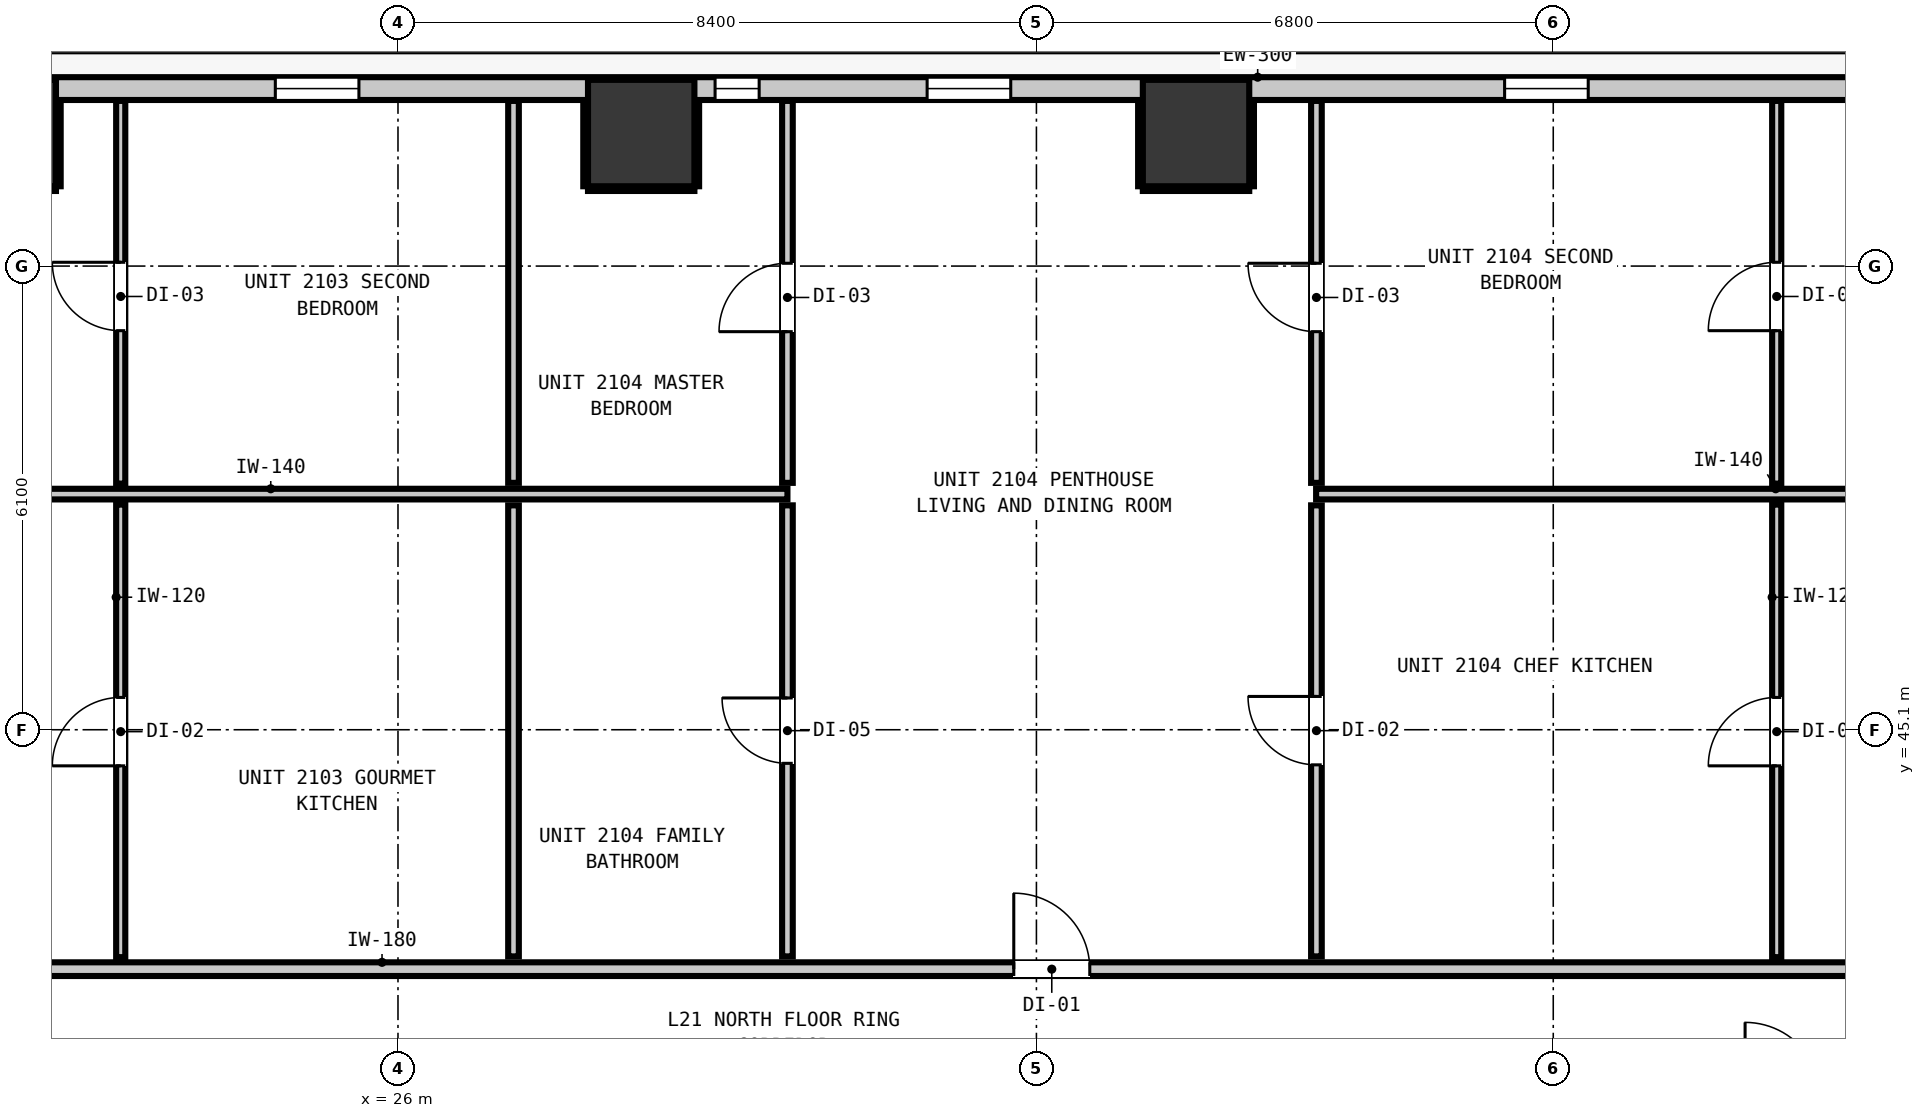
"""IFC4 building model, lengths in metres.
Left out: names, types, materials, properties, quantities, classifications, styles, units other than length and angle.
Written with IfcOpenShell. Run it as: python <this file> out.ifc"""

import sys

from ifc_helpers import new_model, si_unit, direction, frame, frame_2d, origin, origin_2d, place, context, subcontext, project, spatial, rectangle, extrude, element, fill, save


model = new_model("IFC4")
c1 = context("Model", 3, precision=1e-05, world=origin(), true_north=direction((0.0, 1.0)))
c2 = subcontext(c1, "Body", "Model", "MODEL_VIEW")
j1 = project(units=[si_unit("LENGTHUNIT", "METRE"), si_unit("PLANEANGLEUNIT", "RADIAN")], contexts=[c1])
p1 = place(None, origin())
s1 = spatial("IfcSite", under=j1, at=p1, CompositionType="ELEMENT")
p2 = place(p1, origin())
s2 = spatial("IfcBuilding", under=s1, at=p2, CompositionType="ELEMENT")
p3 = place(p2, frame((0.0, 0.0, 75.12)))
s3 = spatial("IfcBuildingStorey", under=s2, at=p3, CompositionType="ELEMENT", Elevation=75.12)
for number, where, z_axis, x_axis in (
    (1, (20.8, 52.95, 0.0), (0.0, 0.0, 1.0), (1.0, 0.0, 0.0)),
    (2, (29.2, 52.95, 0.0), (0.0, 0.0, 1.0), (1.0, 0.0, 0.0)),
    (3, (36.5, 52.95, 0.0), (0.0, 0.0, 1.0), (1.0, 0.0, 0.0)),
):
    element("IfcColumn", number, at=place(p3, frame(where, z_axis=z_axis, x_axis=x_axis)), inside=s3, PredefinedType="COLUMN", context=c2, shape_type="SweptSolid", body=[
        extrude(rectangle(XDim=1.4, YDim=1.4, at=origin_2d()), origin(), (0.0, 0.0, 1.0), 3.32),
    ])
p4 = place(p3, frame((10.365, 53.535, 0.0), z_axis=(0.0, 0.0, 1.0), x_axis=(1.0, 0.0, 0.0)))
e4 = element("IfcWall", 4, at=p4, inside=s3, PredefinedType="STANDARD", context=c2, shape_type="SweptSolid", body=[
    extrude(rectangle(XDim=37.47, YDim=0.3, at=frame_2d((18.735, 0.0))), origin(), (0.0, 0.0, 1.0), 3.06),
])
p5 = place(p4, frame((4.403, 0.0, 0.0)))
e5 = element("IfcOpeningElement", 5, at=p5, cuts=e4, PredefinedType="OPENING", context=c2, shape_type="SweptSolid", body=[
    extrude(rectangle(XDim=1.0, YDim=2.15, at=frame_2d((0.5, 1.075))), frame((0.0, 0.16, 0.0), z_axis=(0.0, -1.0, 0.0), x_axis=(1.0, 0.0, 0.0)), (0.0, 0.0, 1.0), 0.32),
])
p6 = place(p4, frame((7.119, 0.0, 0.85)))
e6 = element("IfcOpeningElement", 6, at=p6, cuts=e4, PredefinedType="OPENING", context=c2, shape_type="SweptSolid", body=[
    extrude(rectangle(XDim=1.1, YDim=2.05, at=frame_2d((0.55, 1.025))), frame((0.0, 0.16, 0.0), z_axis=(0.0, -1.0, 0.0), x_axis=(1.0, 0.0, 0.0)), (0.0, 0.0, 1.0), 0.32),
])
p7 = place(p4, frame((0.324, 0.0, 0.85)))
e7 = element("IfcOpeningElement", 7, at=p7, cuts=e4, PredefinedType="OPENING", context=c2, shape_type="SweptSolid", body=[
    extrude(rectangle(XDim=0.58, YDim=1.5, at=frame_2d((0.29, 0.75))), frame((0.0, 0.16, 0.0), z_axis=(0.0, -1.0, 0.0), x_axis=(1.0, 0.0, 0.0)), (0.0, 0.0, 1.0), 0.32),
])
p8 = place(p4, frame((14.021, 0.0, 0.85)))
e8 = element("IfcOpeningElement", 8, at=p8, cuts=e4, PredefinedType="OPENING", context=c2, shape_type="SweptSolid", body=[
    extrude(rectangle(XDim=1.1, YDim=2.05, at=frame_2d((0.55, 1.025))), frame((0.0, 0.16, 0.0), z_axis=(0.0, -1.0, 0.0), x_axis=(1.0, 0.0, 0.0)), (0.0, 0.0, 1.0), 0.32),
])
p9 = place(p4, frame((22.597, 0.0, 0.85)))
e9 = element("IfcOpeningElement", 9, at=p9, cuts=e4, PredefinedType="OPENING", context=c2, shape_type="SweptSolid", body=[
    extrude(rectangle(XDim=1.1, YDim=2.05, at=frame_2d((0.55, 1.025))), frame((0.0, 0.16, 0.0), z_axis=(0.0, -1.0, 0.0), x_axis=(1.0, 0.0, 0.0)), (0.0, 0.0, 1.0), 0.32),
])
p10 = place(p4, frame((19.807, 0.0, 0.85)))
e10 = element("IfcOpeningElement", 10, at=p10, cuts=e4, PredefinedType="OPENING", context=c2, shape_type="SweptSolid", body=[
    extrude(rectangle(XDim=0.58, YDim=1.5, at=frame_2d((0.29, 0.75))), frame((0.0, 0.16, 0.0), z_axis=(0.0, -1.0, 0.0), x_axis=(1.0, 0.0, 0.0)), (0.0, 0.0, 1.0), 0.32),
])
p11 = place(p4, frame((30.195, 0.0, 0.85)))
e11 = element("IfcOpeningElement", 11, at=p11, cuts=e4, PredefinedType="OPENING", context=c2, shape_type="SweptSolid", body=[
    extrude(rectangle(XDim=1.1, YDim=2.05, at=frame_2d((0.55, 1.025))), frame((0.0, 0.16, 0.0), z_axis=(0.0, -1.0, 0.0), x_axis=(1.0, 0.0, 0.0)), (0.0, 0.0, 1.0), 0.32),
])
p12 = place(p4, frame((35.078, 0.0, 0.85)))
e12 = element("IfcOpeningElement", 12, at=p12, cuts=e4, PredefinedType="OPENING", context=c2, shape_type="SweptSolid", body=[
    extrude(rectangle(XDim=1.1, YDim=2.05, at=frame_2d((0.55, 1.025))), frame((0.0, 0.16, 0.0), z_axis=(0.0, -1.0, 0.0), x_axis=(1.0, 0.0, 0.0)), (0.0, 0.0, 1.0), 0.32),
])
p13 = place(p3, frame((8.027, 41.95, 0.0), z_axis=(0.0, 0.0, 1.0), x_axis=(1.0, 0.0, 0.0)))
e13 = element("IfcWall", 13, at=p13, inside=s3, PredefinedType="PARTITIONING", context=c2, shape_type="SweptSolid", body=[
    extrude(rectangle(XDim=42.146, YDim=0.18, at=frame_2d((21.073, 0.0))), origin(), (0.0, 0.0, 1.0), 3.06),
])
p14 = place(p13, frame((8.451, 0.0, 0.0)))
e14 = element("IfcOpeningElement", 14, at=p14, cuts=e13, PredefinedType="OPENING", context=c2, shape_type="SweptSolid", body=[
    extrude(rectangle(XDim=1.0, YDim=2.15, at=frame_2d((0.5, 1.075))), frame((0.0, 0.1, 0.0), z_axis=(0.0, -1.0, 0.0), x_axis=(1.0, 0.0, 0.0)), (0.0, 0.0, 1.0), 0.2),
])
p15 = place(p13, frame((26.075, 0.0, 0.0)))
e15 = element("IfcOpeningElement", 15, at=p15, cuts=e13, PredefinedType="OPENING", context=c2, shape_type="SweptSolid", body=[
    extrude(rectangle(XDim=1.0, YDim=2.15, at=frame_2d((0.5, 1.075))), frame((0.0, 0.1, 0.0), z_axis=(0.0, -1.0, 0.0), x_axis=(1.0, 0.0, 0.0)), (0.0, 0.0, 1.0), 0.2),
])
p16 = place(p3, frame((8.027, 48.2, 0.0), z_axis=(0.0, 0.0, 1.0), x_axis=(1.0, 0.0, 0.0)))
e16 = element("IfcWall", 16, at=p16, inside=s3, PredefinedType="PARTITIONING", context=c2, shape_type="SweptSolid", body=[
    extrude(rectangle(XDim=23.097, YDim=0.14, at=frame_2d((11.548, 0.0))), origin(), (0.0, 0.0, 1.0), 3.06),
])
p17 = place(p16, frame((8.501, 0.0, 0.0)))
e17 = element("IfcOpeningElement", 17, at=p17, cuts=e16, PredefinedType="OPENING", context=c2, shape_type="SweptSolid", body=[
    extrude(rectangle(XDim=0.9, YDim=2.1, at=frame_2d((0.45, 1.05))), frame((0.0, 0.08, 0.0), z_axis=(0.0, -1.0, 0.0), x_axis=(1.0, 0.0, 0.0)), (0.0, 0.0, 1.0), 0.16),
])
p18 = place(p3, frame((38.08, 48.2, 0.0), z_axis=(0.0, 0.0, 1.0), x_axis=(1.0, 0.0, 0.0)))
e18 = element("IfcWall", 18, at=p18, inside=s3, PredefinedType="PARTITIONING", context=c2, shape_type="SweptSolid", body=[
    extrude(rectangle(XDim=12.093, YDim=0.14, at=frame_2d((6.046, 0.0))), origin(), (0.0, 0.0, 1.0), 3.06),
])
p19 = place(p3, frame((27.52, 42.118, 0.0), z_axis=(0.0, 0.0, 1.0), x_axis=(0.0, 1.0, 0.0)))
e19 = element("IfcWall", 19, at=p19, inside=s3, PredefinedType="PARTITIONING", context=c2, shape_type="SweptSolid", body=[
    extrude(rectangle(XDim=5.934, YDim=0.14, at=frame_2d((2.967, 0.0))), origin(), (0.0, 0.0, 1.0), 3.06),
])
p20 = place(p3, frame((27.52, 48.348, 0.0), z_axis=(0.0, 0.0, 1.0), x_axis=(0.0, 1.0, 0.0)))
e20 = element("IfcWall", 20, at=p20, inside=s3, PredefinedType="PARTITIONING", context=c2, shape_type="SweptSolid", body=[
    extrude(rectangle(XDim=5.025, YDim=0.14, at=frame_2d((2.513, 0.0))), origin(), (0.0, 0.0, 1.0), 3.06),
])
p21 = place(p3, frame((31.124, 42.118, 0.0), z_axis=(0.0, 0.0, 1.0), x_axis=(0.0, 1.0, 0.0)))
e21 = element("IfcWall", 21, at=p21, inside=s3, PredefinedType="PARTITIONING", context=c2, shape_type="SweptSolid", body=[
    extrude(rectangle(XDim=5.934, YDim=0.14, at=frame_2d((2.967, 0.0))), origin(), (0.0, 0.0, 1.0), 3.06),
])
p22 = place(p21, frame((2.54, 0.0, 0.0)))
e22 = element("IfcOpeningElement", 22, at=p22, cuts=e21, PredefinedType="OPENING", context=c2, shape_type="SweptSolid", body=[
    extrude(rectangle(XDim=0.86, YDim=2.02, at=frame_2d((0.43, 1.01))), frame((0.0, 0.08, 0.0), z_axis=(0.0, -1.0, 0.0), x_axis=(1.0, 0.0, 0.0)), (0.0, 0.0, 1.0), 0.16),
])
p23 = place(p3, frame((31.124, 48.348, 0.0), z_axis=(0.0, 0.0, 1.0), x_axis=(0.0, 1.0, 0.0)))
e23 = element("IfcWall", 23, at=p23, inside=s3, PredefinedType="PARTITIONING", context=c2, shape_type="SweptSolid", body=[
    extrude(rectangle(XDim=5.025, YDim=0.14, at=frame_2d((2.513, 0.0))), origin(), (0.0, 0.0, 1.0), 3.06),
])
p24 = place(p23, frame((1.989, 0.0, 0.0)))
e24 = element("IfcOpeningElement", 24, at=p24, cuts=e23, PredefinedType="OPENING", context=c2, shape_type="SweptSolid", body=[
    extrude(rectangle(XDim=0.9, YDim=2.1, at=frame_2d((0.45, 1.05))), frame((0.0, 0.08, 0.0), z_axis=(0.0, -1.0, 0.0), x_axis=(1.0, 0.0, 0.0)), (0.0, 0.0, 1.0), 0.16),
])
p25 = place(p3, frame((38.084, 42.118, 0.0), z_axis=(0.0, 0.0, 1.0), x_axis=(0.0, 1.0, 0.0)))
e25 = element("IfcWall", 25, at=p25, inside=s3, PredefinedType="PARTITIONING", context=c2, shape_type="SweptSolid", body=[
    extrude(rectangle(XDim=5.934, YDim=0.14, at=frame_2d((2.967, 0.0))), origin(), (0.0, 0.0, 1.0), 3.06),
])
p26 = place(p25, frame((2.52, 0.0, 0.0)))
e26 = element("IfcOpeningElement", 26, at=p26, cuts=e25, PredefinedType="OPENING", context=c2, shape_type="SweptSolid", body=[
    extrude(rectangle(XDim=0.9, YDim=2.1, at=frame_2d((0.45, 1.05))), frame((0.0, 0.08, 0.0), z_axis=(0.0, -1.0, 0.0), x_axis=(1.0, 0.0, 0.0)), (0.0, 0.0, 1.0), 0.16),
])
p27 = place(p3, frame((38.084, 48.348, 0.0), z_axis=(0.0, 0.0, 1.0), x_axis=(0.0, 1.0, 0.0)))
e27 = element("IfcWall", 27, at=p27, inside=s3, PredefinedType="PARTITIONING", context=c2, shape_type="SweptSolid", body=[
    extrude(rectangle(XDim=5.025, YDim=0.14, at=frame_2d((2.513, 0.0))), origin(), (0.0, 0.0, 1.0), 3.06),
])
p28 = place(p27, frame((1.989, 0.0, 0.0)))
e28 = element("IfcOpeningElement", 28, at=p28, cuts=e27, PredefinedType="OPENING", context=c2, shape_type="SweptSolid", body=[
    extrude(rectangle(XDim=0.9, YDim=2.1, at=frame_2d((0.45, 1.05))), frame((0.0, 0.08, 0.0), z_axis=(0.0, -1.0, 0.0), x_axis=(1.0, 0.0, 0.0)), (0.0, 0.0, 1.0), 0.16),
])
p29 = place(p3, frame((22.352, 42.108, 0.0), z_axis=(0.0, 0.0, 1.0), x_axis=(0.0, 1.0, 0.0)))
e29 = element("IfcWall", 29, at=p29, inside=s3, PredefinedType="PARTITIONING", context=c2, shape_type="SweptSolid", body=[
    extrude(rectangle(XDim=5.954, YDim=0.12, at=frame_2d((2.977, 0.0))), origin(), (0.0, 0.0, 1.0), 3.06),
])
p30 = place(p29, frame((2.517, 0.0, 0.0)))
e30 = element("IfcOpeningElement", 30, at=p30, cuts=e29, PredefinedType="OPENING", context=c2, shape_type="SweptSolid", body=[
    extrude(rectangle(XDim=0.9, YDim=2.1, at=frame_2d((0.45, 1.05))), frame((0.0, 0.07, 0.0), z_axis=(0.0, -1.0, 0.0), x_axis=(1.0, 0.0, 0.0)), (0.0, 0.0, 1.0), 0.14),
])
p31 = place(p3, frame((22.352, 48.338, 0.0), z_axis=(0.0, 0.0, 1.0), x_axis=(0.0, 1.0, 0.0)))
e31 = element("IfcWall", 31, at=p31, inside=s3, PredefinedType="PARTITIONING", context=c2, shape_type="SweptSolid", body=[
    extrude(rectangle(XDim=5.035, YDim=0.12, at=frame_2d((2.518, 0.0))), origin(), (0.0, 0.0, 1.0), 3.06),
])
p32 = place(p31, frame((2.012, 0.0, 0.0)))
e32 = element("IfcOpeningElement", 32, at=p32, cuts=e31, PredefinedType="OPENING", context=c2, shape_type="SweptSolid", body=[
    extrude(rectangle(XDim=0.9, YDim=2.1, at=frame_2d((0.45, 1.05))), frame((0.0, 0.07, 0.0), z_axis=(0.0, -1.0, 0.0), x_axis=(1.0, 0.0, 0.0)), (0.0, 0.0, 1.0), 0.14),
])
p33 = place(p3, frame((44.14, 42.108, 0.0), z_axis=(0.0, 0.0, 1.0), x_axis=(0.0, 1.0, 0.0)))
e33 = element("IfcWall", 33, at=p33, inside=s3, PredefinedType="PARTITIONING", context=c2, shape_type="SweptSolid", body=[
    extrude(rectangle(XDim=5.954, YDim=0.12, at=frame_2d((2.977, 0.0))), origin(), (0.0, 0.0, 1.0), 3.06),
])
p34 = place(p33, frame((2.517, 0.0, 0.0)))
e34 = element("IfcOpeningElement", 34, at=p34, cuts=e33, PredefinedType="OPENING", context=c2, shape_type="SweptSolid", body=[
    extrude(rectangle(XDim=0.9, YDim=2.1, at=frame_2d((0.45, 1.05))), frame((0.0, 0.07, 0.0), z_axis=(0.0, -1.0, 0.0), x_axis=(1.0, 0.0, 0.0)), (0.0, 0.0, 1.0), 0.14),
])
p35 = place(p3, frame((44.14, 48.338, 0.0), z_axis=(0.0, 0.0, 1.0), x_axis=(0.0, 1.0, 0.0)))
e35 = element("IfcWall", 35, at=p35, inside=s3, PredefinedType="PARTITIONING", context=c2, shape_type="SweptSolid", body=[
    extrude(rectangle(XDim=5.035, YDim=0.12, at=frame_2d((2.518, 0.0))), origin(), (0.0, 0.0, 1.0), 3.06),
])
p36 = place(p35, frame((2.012, 0.0, 0.0)))
e36 = element("IfcOpeningElement", 36, at=p36, cuts=e35, PredefinedType="OPENING", context=c2, shape_type="SweptSolid", body=[
    extrude(rectangle(XDim=0.9, YDim=2.1, at=frame_2d((0.45, 1.05))), frame((0.0, 0.07, 0.0), z_axis=(0.0, -1.0, 0.0), x_axis=(1.0, 0.0, 0.0)), (0.0, 0.0, 1.0), 0.14),
])
p37 = place(p3, frame((20.1, 52.218, 0.0), z_axis=(0.0, 0.0, 1.0), x_axis=(1.0, 0.0, 0.0)))
e37 = element("IfcWall", 37, at=p37, inside=s3, PredefinedType="PARTITIONING", context=c2, shape_type="SweptSolid", body=[
    extrude(rectangle(XDim=1.4, YDim=0.06, at=frame_2d((0.7, 0.0))), origin(), (0.0, 0.0, 1.0), 1.45),
])
p38 = place(p3, frame((21.532, 52.25, 0.0), z_axis=(0.0, 0.0, 1.0), x_axis=(0.0, 1.0, 0.0)))
e38 = element("IfcWall", 38, at=p38, inside=s3, PredefinedType="PARTITIONING", context=c2, shape_type="SweptSolid", body=[
    extrude(rectangle(XDim=1.12, YDim=0.06, at=frame_2d((0.56, 0.0))), origin(), (0.0, 0.0, 1.0), 1.45),
])
p39 = place(p3, frame((28.5, 52.218, 0.0), z_axis=(0.0, 0.0, 1.0), x_axis=(1.0, 0.0, 0.0)))
e39 = element("IfcWall", 39, at=p39, inside=s3, PredefinedType="PARTITIONING", context=c2, shape_type="SweptSolid", body=[
    extrude(rectangle(XDim=1.4, YDim=0.06, at=frame_2d((0.7, 0.0))), origin(), (0.0, 0.0, 1.0), 1.45),
])
for number, where, z_axis, x_axis in (
    (40, (28.468, 52.25, 0.0), (0.0, 0.0, 1.0), (0.0, 1.0, 0.0)),
    (41, (29.932, 52.25, 0.0), (0.0, 0.0, 1.0), (0.0, 1.0, 0.0)),
):
    element("IfcWall", number, at=place(p3, frame(where, z_axis=z_axis, x_axis=x_axis)), inside=s3, PredefinedType="PARTITIONING", context=c2, shape_type="SweptSolid", body=[
        extrude(rectangle(XDim=1.12, YDim=0.06, at=frame_2d((0.56, 0.0))), origin(), (0.0, 0.0, 1.0), 1.45),
    ])
p40 = place(p3, frame((35.8, 52.218, 0.0), z_axis=(0.0, 0.0, 1.0), x_axis=(1.0, 0.0, 0.0)))
e42 = element("IfcWall", 42, at=p40, inside=s3, PredefinedType="PARTITIONING", context=c2, shape_type="SweptSolid", body=[
    extrude(rectangle(XDim=1.4, YDim=0.06, at=frame_2d((0.7, 0.0))), origin(), (0.0, 0.0, 1.0), 1.45),
])
for number, where, z_axis, x_axis in (
    (43, (35.768, 52.25, 0.0), (0.0, 0.0, 1.0), (0.0, 1.0, 0.0)),
    (44, (37.232, 52.25, 0.0), (0.0, 0.0, 1.0), (0.0, 1.0, 0.0)),
):
    element("IfcWall", number, at=place(p3, frame(where, z_axis=z_axis, x_axis=x_axis)), inside=s3, PredefinedType="PARTITIONING", context=c2, shape_type="SweptSolid", body=[
        extrude(rectangle(XDim=1.12, YDim=0.06, at=frame_2d((0.56, 0.0))), origin(), (0.0, 0.0, 1.0), 1.45),
    ])
p41 = place(p8, origin())
e45 = element("IfcWindow", 45, at=p41, inside=s3, PartitioningType="SINGLE_PANEL", PredefinedType="WINDOW", context=c2, shape_type="SweptSolid", body=[
    extrude(rectangle(XDim=1.1, YDim=2.05, at=frame_2d((0.55, 1.025))), frame((0.0, 0.03, 0.0), z_axis=(0.0, -1.0, 0.0), x_axis=(1.0, 0.0, 0.0)), (0.0, 0.0, 1.0), 0.06),
])
fill(e8, e45)
p42 = place(p9, origin())
e46 = element("IfcWindow", 46, at=p42, inside=s3, PartitioningType="SINGLE_PANEL", PredefinedType="WINDOW", context=c2, shape_type="SweptSolid", body=[
    extrude(rectangle(XDim=1.1, YDim=2.05, at=frame_2d((0.55, 1.025))), frame((0.0, 0.03, 0.0), z_axis=(0.0, -1.0, 0.0), x_axis=(1.0, 0.0, 0.0)), (0.0, 0.0, 1.0), 0.06),
])
fill(e9, e46)
p43 = place(p10, origin())
e47 = element("IfcWindow", 47, at=p43, inside=s3, PartitioningType="SINGLE_PANEL", PredefinedType="WINDOW", context=c2, shape_type="SweptSolid", body=[
    extrude(rectangle(XDim=0.58, YDim=1.5, at=frame_2d((0.29, 0.75))), frame((0.0, 0.03, 0.0), z_axis=(0.0, -1.0, 0.0), x_axis=(1.0, 0.0, 0.0)), (0.0, 0.0, 1.0), 0.06),
])
fill(e10, e47)
p44 = place(p11, origin())
e48 = element("IfcWindow", 48, at=p44, inside=s3, PartitioningType="SINGLE_PANEL", PredefinedType="WINDOW", context=c2, shape_type="SweptSolid", body=[
    extrude(rectangle(XDim=1.1, YDim=2.05, at=frame_2d((0.55, 1.025))), frame((0.0, 0.03, 0.0), z_axis=(0.0, -1.0, 0.0), x_axis=(1.0, 0.0, 0.0)), (0.0, 0.0, 1.0), 0.06),
])
fill(e11, e48)
p45 = place(p30, origin())
e49 = element("IfcDoor", 49, at=p45, inside=s3, OperationType="SINGLE_SWING_LEFT", PredefinedType="DOOR", context=c2, shape_type="SweptSolid", body=[
    extrude(rectangle(XDim=0.9, YDim=2.1, at=frame_2d((0.45, 1.05))), frame((0.0, 0.025, 0.0), z_axis=(0.0, -1.0, 0.0), x_axis=(1.0, 0.0, 0.0)), (0.0, 0.0, 1.0), 0.05),
])
fill(e30, e49)
p46 = place(p32, origin())
e50 = element("IfcDoor", 50, at=p46, inside=s3, OperationType="SINGLE_SWING_RIGHT", PredefinedType="DOOR", context=c2, shape_type="SweptSolid", body=[
    extrude(rectangle(XDim=0.9, YDim=2.1, at=frame_2d((0.45, 1.05))), frame((0.0, 0.025, 0.0), z_axis=(0.0, -1.0, 0.0), x_axis=(1.0, 0.0, 0.0)), (0.0, 0.0, 1.0), 0.05),
])
fill(e32, e50)
p47 = place(p15, origin())
e51 = element("IfcDoor", 51, at=p47, inside=s3, OperationType="SINGLE_SWING_LEFT", PredefinedType="DOOR", context=c2, shape_type="SweptSolid", body=[
    extrude(rectangle(XDim=1.0, YDim=2.15, at=frame_2d((0.5, 1.075))), frame((0.0, 0.025, 0.0), z_axis=(0.0, -1.0, 0.0), x_axis=(1.0, 0.0, 0.0)), (0.0, 0.0, 1.0), 0.05),
])
fill(e15, e51)
p48 = place(p22, origin())
e52 = element("IfcDoor", 52, at=p48, inside=s3, OperationType="SINGLE_SWING_RIGHT", PredefinedType="DOOR", context=c2, shape_type="SweptSolid", body=[
    extrude(rectangle(XDim=0.86, YDim=2.02, at=frame_2d((0.43, 1.01))), frame((0.0, 0.025, 0.0), z_axis=(0.0, -1.0, 0.0), x_axis=(1.0, 0.0, 0.0)), (0.0, 0.0, 1.0), 0.05),
])
fill(e22, e52)
p49 = place(p24, origin())
e53 = element("IfcDoor", 53, at=p49, inside=s3, OperationType="SINGLE_SWING_LEFT", PredefinedType="DOOR", context=c2, shape_type="SweptSolid", body=[
    extrude(rectangle(XDim=0.9, YDim=2.1, at=frame_2d((0.45, 1.05))), frame((0.0, 0.025, 0.0), z_axis=(0.0, -1.0, 0.0), x_axis=(1.0, 0.0, 0.0)), (0.0, 0.0, 1.0), 0.05),
])
fill(e24, e53)
p50 = place(p26, origin())
e54 = element("IfcDoor", 54, at=p50, inside=s3, OperationType="SINGLE_SWING_RIGHT", PredefinedType="DOOR", context=c2, shape_type="SweptSolid", body=[
    extrude(rectangle(XDim=0.9, YDim=2.1, at=frame_2d((0.45, 1.05))), frame((0.0, 0.025, 0.0), z_axis=(0.0, -1.0, 0.0), x_axis=(1.0, 0.0, 0.0)), (0.0, 0.0, 1.0), 0.05),
])
fill(e26, e54)
p51 = place(p34, origin())
e55 = element("IfcDoor", 55, at=p51, inside=s3, OperationType="SINGLE_SWING_LEFT", PredefinedType="DOOR", context=c2, shape_type="SweptSolid", body=[
    extrude(rectangle(XDim=0.9, YDim=2.1, at=frame_2d((0.45, 1.05))), frame((0.0, 0.025, 0.0), z_axis=(0.0, -1.0, 0.0), x_axis=(1.0, 0.0, 0.0)), (0.0, 0.0, 1.0), 0.05),
])
fill(e34, e55)
p52 = place(p28, origin())
e56 = element("IfcDoor", 56, at=p52, inside=s3, OperationType="SINGLE_SWING_RIGHT", PredefinedType="DOOR", context=c2, shape_type="SweptSolid", body=[
    extrude(rectangle(XDim=0.9, YDim=2.1, at=frame_2d((0.45, 1.05))), frame((0.0, 0.025, 0.0), z_axis=(0.0, -1.0, 0.0), x_axis=(1.0, 0.0, 0.0)), (0.0, 0.0, 1.0), 0.05),
])
fill(e28, e56)
p53 = place(p36, origin())
e57 = element("IfcDoor", 57, at=p53, inside=s3, OperationType="SINGLE_SWING_LEFT", PredefinedType="DOOR", context=c2, shape_type="SweptSolid", body=[
    extrude(rectangle(XDim=0.9, YDim=2.1, at=frame_2d((0.45, 1.05))), frame((0.0, 0.025, 0.0), z_axis=(0.0, -1.0, 0.0), x_axis=(1.0, 0.0, 0.0)), (0.0, 0.0, 1.0), 0.05),
])
fill(e36, e57)
save(model, sys.argv[1])
